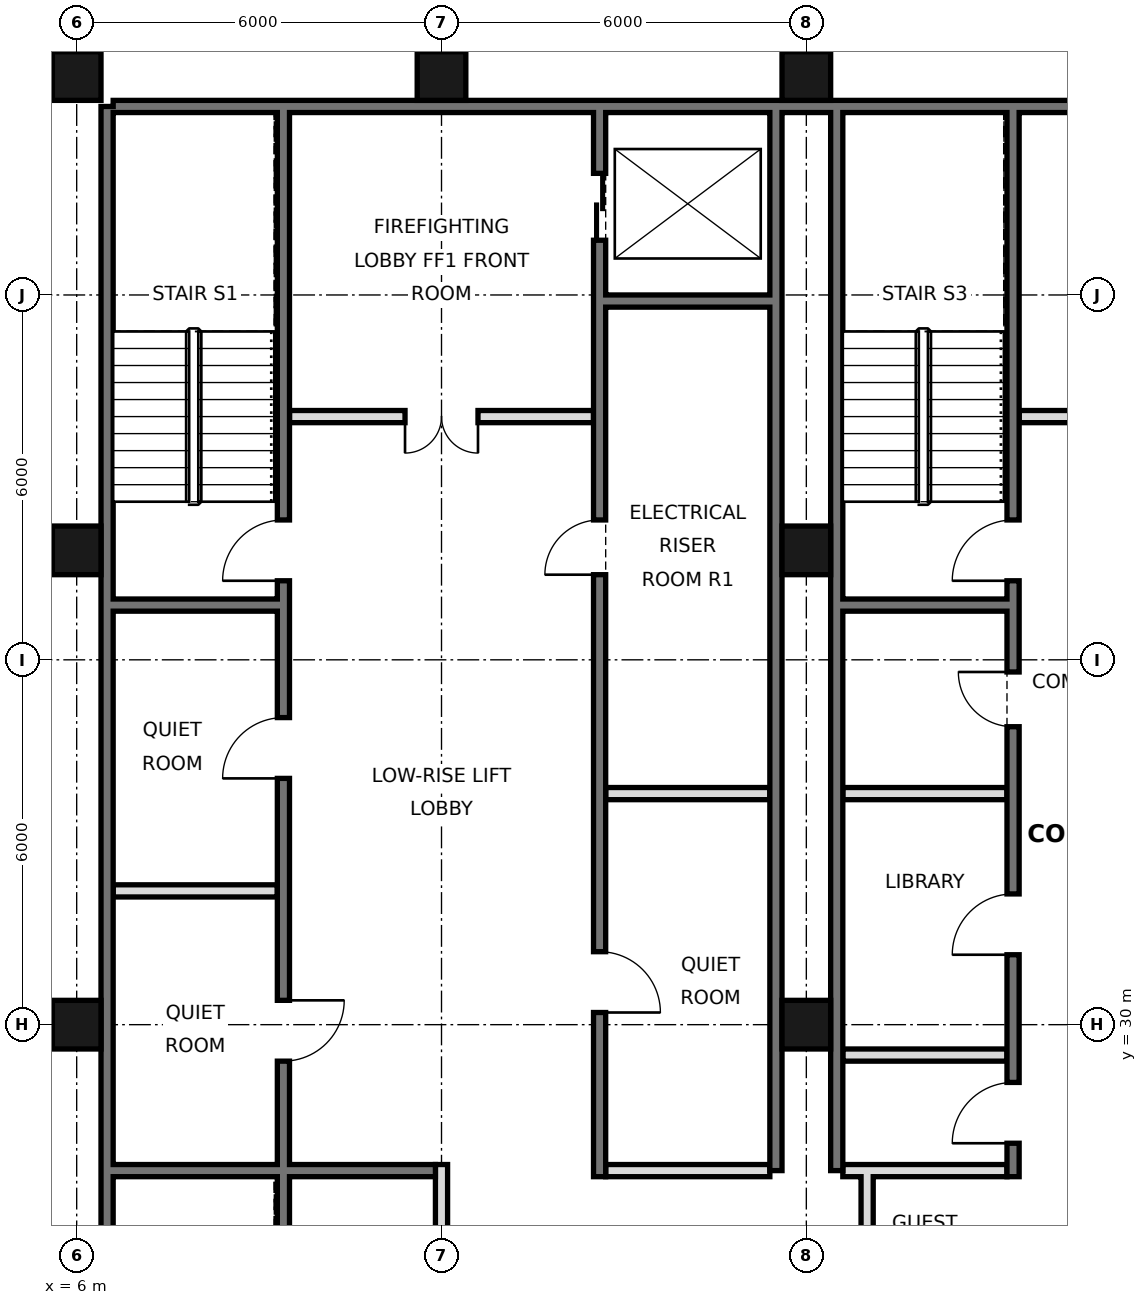
"""IFC4 building model, lengths in metres.
Left out: names, types, materials, properties, quantities, classifications, styles, units other than length and angle.
Written with IfcOpenShell. Run it as: python <this file> out.ifc"""

import sys

from ifc_helpers import new_model, si_unit, direction, frame, frame_2d, origin, origin_2d, place, context, subcontext, project, spatial, rectangle, hollow_rectangle, extrude, element, fill, save


model = new_model("IFC4")
c1 = context("Model", 3, precision=1e-05, world=origin(), true_north=direction((0.0, 1.0)))
c2 = subcontext(c1, "Body", "Model", "MODEL_VIEW")
j1 = project(units=[si_unit("LENGTHUNIT", "METRE"), si_unit("PLANEANGLEUNIT", "RADIAN")], contexts=[c1])
p1 = place(None, origin())
s1 = spatial("IfcSite", under=j1, at=p1, CompositionType="ELEMENT")
p2 = place(p1, origin())
s2 = spatial("IfcBuilding", under=s1, at=p2, CompositionType="ELEMENT")
p3 = place(p2, frame((0.0, 0.0, 266.6)))
s3 = spatial("IfcBuildingStorey", under=s2, at=p3, CompositionType="ELEMENT", Elevation=266.6)
for number, where, z_axis, x_axis in (
    (1, (6.0, 30.0, 0.0), (0.0, 0.0, 1.0), (1.0, 0.0, 0.0)),
    (2, (6.0, 37.8, 0.0), (0.0, 0.0, 1.0), (1.0, 0.0, 0.0)),
    (3, (6.0, 45.6, 0.0), (0.0, 0.0, 1.0), (1.0, 0.0, 0.0)),
    (4, (12.0, 45.6, 0.0), (0.0, 0.0, 1.0), (1.0, 0.0, 0.0)),
    (5, (18.0, 30.0, 0.0), (0.0, 0.0, 1.0), (1.0, 0.0, 0.0)),
    (6, (18.0, 37.8, 0.0), (0.0, 0.0, 1.0), (1.0, 0.0, 0.0)),
    (7, (18.0, 45.6, 0.0), (0.0, 0.0, 1.0), (1.0, 0.0, 0.0)),
):
    element("IfcColumn", number, at=place(p3, frame(where, z_axis=z_axis, x_axis=x_axis)), inside=s3, PredefinedType="COLUMN", context=c2, shape_type="SweptSolid", body=[
        extrude(hollow_rectangle(XDim=0.8, YDim=0.8, WallThickness=0.032, at=origin_2d()), origin(), (0.0, 0.0, 1.0), 3.6),
    ])
p4 = place(p3, frame((6.5, 21.6, 0.0), z_axis=(0.0, 0.0, 1.0), x_axis=(0.0, 1.0, 0.0)))
e8 = element("IfcWall", 8, at=p4, inside=s3, PredefinedType="SOLIDWALL", context=c2, shape_type="SweptSolid", body=[
    extrude(rectangle(XDim=23.5, YDim=0.2, at=frame_2d((11.75, 0.0))), origin(), (0.0, 0.0, 1.0), 3.42),
])
p5 = place(p3, frame((6.6, 45.1, 0.0), z_axis=(0.0, 0.0, 1.0), x_axis=(1.0, 0.0, 0.0)))
e9 = element("IfcWall", 9, at=p5, inside=s3, PredefinedType="SOLIDWALL", context=c2, shape_type="SweptSolid", body=[
    extrude(rectangle(XDim=34.8, YDim=0.2, at=frame_2d((17.4, 0.0))), origin(), (0.0, 0.0, 1.0), 3.42),
])
for number, where, z_axis, x_axis in (
    (10, (17.5, 27.6, 0.0), (0.0, 0.0, 1.0), (0.0, 1.0, 0.0)),
    (11, (18.5, 27.6, 0.0), (0.0, 0.0, 1.0), (0.0, 1.0, 0.0)),
):
    element("IfcWall", number, at=place(p3, frame(where, z_axis=z_axis, x_axis=x_axis)), inside=s3, PredefinedType="SOLIDWALL", context=c2, shape_type="SweptSolid", body=[
        extrude(rectangle(XDim=17.5, YDim=0.2, at=frame_2d((8.75, 0.0))), origin(), (0.0, 0.0, 1.0), 3.42),
    ])
p6 = place(p3, frame((19.0, 21.6, 0.0), z_axis=(0.0, 0.0, 1.0), x_axis=(0.0, 1.0, 0.0)))
e12 = element("IfcWall", 12, at=p6, inside=s3, PredefinedType="PARTITIONING", context=c2, shape_type="SweptSolid", body=[
    extrude(rectangle(XDim=6.0, YDim=0.2, at=frame_2d((3.0, 0.0))), origin(), (0.0, 0.0, 1.0), 3.42),
])
p7 = place(p6, frame((2.1, 0.0, 0.0)))
e13 = element("IfcOpeningElement", 13, at=p7, cuts=e12, PredefinedType="OPENING", context=c2, shape_type="SweptSolid", body=[
    extrude(rectangle(XDim=1.8, YDim=2.1, at=frame_2d((0.9, 1.05))), frame((0.0, 0.11, 0.0), z_axis=(0.0, -1.0, 0.0), x_axis=(1.0, 0.0, 0.0)), (0.0, 0.0, 1.0), 0.22),
])
p8 = place(p3, frame((12.0, 21.6, 0.0), z_axis=(0.0, 0.0, 1.0), x_axis=(0.0, 1.0, 0.0)))
e14 = element("IfcWall", 14, at=p8, inside=s3, PredefinedType="PARTITIONING", context=c2, shape_type="SweptSolid", body=[
    extrude(rectangle(XDim=6.1, YDim=0.2, at=frame_2d((3.05, 0.0))), origin(), (0.0, 0.0, 1.0), 3.42),
])
p9 = place(p3, frame((14.6, 27.5, 0.0), z_axis=(0.0, 0.0, 1.0), x_axis=(0.0, 1.0, 0.0)))
e15 = element("IfcWall", 15, at=p9, inside=s3, PredefinedType="SOLIDWALL", context=c2, shape_type="SweptSolid", body=[
    extrude(rectangle(XDim=17.5, YDim=0.2, at=frame_2d((8.75, 0.0))), origin(), (0.0, 0.0, 1.0), 3.42),
])
p10 = place(p9, frame((15.4, 0.0, 0.0)))
e16 = element("IfcOpeningElement", 16, at=p10, cuts=e15, PredefinedType="OPENING", context=c2, shape_type="SweptSolid", body=[
    extrude(rectangle(XDim=1.1, YDim=2.1, at=frame_2d((0.55, 1.05))), frame((0.0, 0.11, 0.0), z_axis=(0.0, -1.0, 0.0), x_axis=(1.0, 0.0, 0.0)), (0.0, 0.0, 1.0), 0.22),
])
p11 = place(p9, frame((2.7, 0.0, 0.0)))
e17 = element("IfcOpeningElement", 17, at=p11, cuts=e15, PredefinedType="OPENING", context=c2, shape_type="SweptSolid", body=[
    extrude(rectangle(XDim=1.0, YDim=2.1, at=frame_2d((0.5, 1.05))), frame((0.0, 0.11, 0.0), z_axis=(0.0, -1.0, 0.0), x_axis=(1.0, 0.0, 0.0)), (0.0, 0.0, 1.0), 0.22),
])
p12 = place(p9, frame((9.9, 0.0, 0.0)))
e18 = element("IfcOpeningElement", 18, at=p12, cuts=e15, PredefinedType="OPENING", context=c2, shape_type="SweptSolid", body=[
    extrude(rectangle(XDim=0.9, YDim=2.1, at=frame_2d((0.45, 1.05))), frame((0.0, 0.11, 0.0), z_axis=(0.0, -1.0, 0.0), x_axis=(1.0, 0.0, 0.0)), (0.0, 0.0, 1.0), 0.22),
])
p13 = place(p3, frame((21.4, 27.5, 0.0), z_axis=(0.0, 0.0, 1.0), x_axis=(0.0, 1.0, 0.0)))
e19 = element("IfcWall", 19, at=p13, inside=s3, PredefinedType="SOLIDWALL", context=c2, shape_type="SweptSolid", body=[
    extrude(rectangle(XDim=17.5, YDim=0.2, at=frame_2d((8.75, 0.0))), origin(), (0.0, 0.0, 1.0), 3.42),
])
p14 = place(p13, frame((0.55, 0.0, 0.0)))
e20 = element("IfcOpeningElement", 20, at=p14, cuts=e19, PredefinedType="OPENING", context=c2, shape_type="SweptSolid", body=[
    extrude(rectangle(XDim=1.0, YDim=2.1, at=frame_2d((0.5, 1.05))), frame((0.0, 0.11, 0.0), z_axis=(0.0, -1.0, 0.0), x_axis=(1.0, 0.0, 0.0)), (0.0, 0.0, 1.0), 0.22),
])
p15 = place(p13, frame((3.65, 0.0, 0.0)))
e21 = element("IfcOpeningElement", 21, at=p15, cuts=e19, PredefinedType="OPENING", context=c2, shape_type="SweptSolid", body=[
    extrude(rectangle(XDim=1.0, YDim=2.1, at=frame_2d((0.5, 1.05))), frame((0.0, 0.11, 0.0), z_axis=(0.0, -1.0, 0.0), x_axis=(1.0, 0.0, 0.0)), (0.0, 0.0, 1.0), 0.22),
])
p16 = place(p13, frame((9.8, 0.0, 0.0)))
e22 = element("IfcOpeningElement", 22, at=p16, cuts=e19, PredefinedType="OPENING", context=c2, shape_type="SweptSolid", body=[
    extrude(rectangle(XDim=1.0, YDim=2.1, at=frame_2d((0.5, 1.05))), frame((0.0, 0.11, 0.0), z_axis=(0.0, -1.0, 0.0), x_axis=(1.0, 0.0, 0.0)), (0.0, 0.0, 1.0), 0.22),
])
p17 = place(p13, frame((7.4, 0.0, 0.0)))
e23 = element("IfcOpeningElement", 23, at=p17, cuts=e19, PredefinedType="OPENING", context=c2, shape_type="SweptSolid", body=[
    extrude(rectangle(XDim=0.9, YDim=2.1, at=frame_2d((0.45, 1.05))), frame((0.0, 0.11, 0.0), z_axis=(0.0, -1.0, 0.0), x_axis=(1.0, 0.0, 0.0)), (0.0, 0.0, 1.0), 0.22),
])
p18 = place(p3, frame((9.4, 21.6, 0.0), z_axis=(0.0, 0.0, 1.0), x_axis=(0.0, 1.0, 0.0)))
e24 = element("IfcWall", 24, at=p18, inside=s3, PredefinedType="SOLIDWALL", context=c2, shape_type="SweptSolid", body=[
    extrude(rectangle(XDim=23.4, YDim=0.2, at=frame_2d((11.7, 0.0))), origin(), (0.0, 0.0, 1.0), 3.42),
])
p19 = place(p18, frame((7.8, 0.0, 0.0)))
e25 = element("IfcOpeningElement", 25, at=p19, cuts=e24, PredefinedType="OPENING", context=c2, shape_type="SweptSolid", body=[
    extrude(rectangle(XDim=1.0, YDim=2.1, at=frame_2d((0.5, 1.05))), frame((0.0, 0.11, 0.0), z_axis=(0.0, -1.0, 0.0), x_axis=(1.0, 0.0, 0.0)), (0.0, 0.0, 1.0), 0.22),
])
p20 = place(p18, frame((12.45, 0.0, 0.0)))
e26 = element("IfcOpeningElement", 26, at=p20, cuts=e24, PredefinedType="OPENING", context=c2, shape_type="SweptSolid", body=[
    extrude(rectangle(XDim=1.0, YDim=2.1, at=frame_2d((0.5, 1.05))), frame((0.0, 0.11, 0.0), z_axis=(0.0, -1.0, 0.0), x_axis=(1.0, 0.0, 0.0)), (0.0, 0.0, 1.0), 0.22),
])
p21 = place(p18, frame((15.7, 0.0, 0.0)))
e27 = element("IfcOpeningElement", 27, at=p21, cuts=e24, PredefinedType="OPENING", context=c2, shape_type="SweptSolid", body=[
    extrude(rectangle(XDim=1.0, YDim=2.1, at=frame_2d((0.5, 1.05))), frame((0.0, 0.11, 0.0), z_axis=(0.0, -1.0, 0.0), x_axis=(1.0, 0.0, 0.0)), (0.0, 0.0, 1.0), 0.22),
])
p22 = place(p18, frame((0.175, 0.0, 0.0)))
e28 = element("IfcOpeningElement", 28, at=p22, cuts=e24, PredefinedType="OPENING", context=c2, shape_type="SweptSolid", body=[
    extrude(rectangle(XDim=0.9, YDim=2.1, at=frame_2d((0.45, 1.05))), frame((0.0, 0.11, 0.0), z_axis=(0.0, -1.0, 0.0), x_axis=(1.0, 0.0, 0.0)), (0.0, 0.0, 1.0), 0.22),
])
for number, where, z_axis, x_axis in (
    (29, (14.7, 27.6, 0.0), (0.0, 0.0, 1.0), (1.0, 0.0, 0.0)),
    (30, (18.6, 27.6, 0.0), (0.0, 0.0, 1.0), (1.0, 0.0, 0.0)),
):
    element("IfcWall", number, at=place(p3, frame(where, z_axis=z_axis, x_axis=x_axis)), inside=s3, PredefinedType="PARTITIONING", context=c2, shape_type="SweptSolid", body=[
        extrude(rectangle(XDim=2.7, YDim=0.2, at=frame_2d((1.35, 0.0))), origin(), (0.0, 0.0, 1.0), 3.42),
    ])
p23 = place(p3, frame((6.6, 27.6, 0.0), z_axis=(0.0, 0.0, 1.0), x_axis=(1.0, 0.0, 0.0)))
e31 = element("IfcWall", 31, at=p23, inside=s3, PredefinedType="SOLIDWALL", context=c2, shape_type="SweptSolid", body=[
    extrude(rectangle(XDim=5.3, YDim=0.2, at=frame_2d((2.65, 0.0))), origin(), (0.0, 0.0, 1.0), 3.42),
])
for number, where, z_axis, x_axis in (
    (32, (18.6, 29.5, 0.0), (0.0, 0.0, 1.0), (1.0, 0.0, 0.0)),
    (33, (6.6, 32.2, 0.0), (0.0, 0.0, 1.0), (1.0, 0.0, 0.0)),
):
    element("IfcWall", number, at=place(p3, frame(where, z_axis=z_axis, x_axis=x_axis)), inside=s3, PredefinedType="PARTITIONING", context=c2, shape_type="SweptSolid", body=[
        extrude(rectangle(XDim=2.7, YDim=0.2, at=frame_2d((1.35, 0.0))), origin(), (0.0, 0.0, 1.0), 3.42),
    ])
for number, where, z_axis, x_axis in (
    (34, (14.7, 33.8, 0.0), (0.0, 0.0, 1.0), (1.0, 0.0, 0.0)),
    (35, (18.6, 33.8, 0.0), (0.0, 0.0, 1.0), (1.0, 0.0, 0.0)),
    (36, (18.6, 36.9, 0.0), (0.0, 0.0, 1.0), (1.0, 0.0, 0.0)),
    (37, (6.6, 36.9, 0.0), (0.0, 0.0, 1.0), (1.0, 0.0, 0.0)),
):
    element("IfcWall", number, at=place(p3, frame(where, z_axis=z_axis, x_axis=x_axis)), inside=s3, PredefinedType="SOLIDWALL", context=c2, shape_type="SweptSolid", body=[
        extrude(rectangle(XDim=2.7, YDim=0.2, at=frame_2d((1.35, 0.0))), origin(), (0.0, 0.0, 1.0), 3.42),
    ])
p24 = place(p3, frame((21.5, 40.0, 0.0), z_axis=(0.0, 0.0, 1.0), x_axis=(1.0, 0.0, 0.0)))
e38 = element("IfcWall", 38, at=p24, inside=s3, PredefinedType="PARTITIONING", context=c2, shape_type="SweptSolid", body=[
    extrude(rectangle(XDim=5.0, YDim=0.2, at=frame_2d((2.5, 0.0))), origin(), (0.0, 0.0, 1.0), 3.42),
])
p25 = place(p24, frame((1.9, 0.0, 0.0)))
e39 = element("IfcOpeningElement", 39, at=p25, cuts=e38, PredefinedType="OPENING", context=c2, shape_type="SweptSolid", body=[
    extrude(rectangle(XDim=1.2, YDim=2.1, at=frame_2d((0.6, 1.05))), frame((0.0, 0.11, 0.0), z_axis=(0.0, -1.0, 0.0), x_axis=(1.0, 0.0, 0.0)), (0.0, 0.0, 1.0), 0.22),
])
p26 = place(p3, frame((9.5, 40.0, 0.0), z_axis=(0.0, 0.0, 1.0), x_axis=(1.0, 0.0, 0.0)))
e40 = element("IfcWall", 40, at=p26, inside=s3, PredefinedType="PARTITIONING", context=c2, shape_type="SweptSolid", body=[
    extrude(rectangle(XDim=5.0, YDim=0.2, at=frame_2d((2.5, 0.0))), origin(), (0.0, 0.0, 1.0), 3.42),
])
p27 = place(p26, frame((1.9, 0.0, 0.0)))
e41 = element("IfcOpeningElement", 41, at=p27, cuts=e40, PredefinedType="OPENING", context=c2, shape_type="SweptSolid", body=[
    extrude(rectangle(XDim=1.2, YDim=2.1, at=frame_2d((0.6, 1.05))), frame((0.0, 0.11, 0.0), z_axis=(0.0, -1.0, 0.0), x_axis=(1.0, 0.0, 0.0)), (0.0, 0.0, 1.0), 0.22),
])
p28 = place(p3, frame((14.7, 41.9, 0.0), z_axis=(0.0, 0.0, 1.0), x_axis=(1.0, 0.0, 0.0)))
e42 = element("IfcWall", 42, at=p28, inside=s3, PredefinedType="SOLIDWALL", context=c2, shape_type="SweptSolid", body=[
    extrude(rectangle(XDim=2.7, YDim=0.2, at=frame_2d((1.35, 0.0))), origin(), (0.0, 0.0, 1.0), 3.42),
])
p29 = place(p27, frame((1.2, 0.0, 0.0), z_axis=(0.0, 0.0, 1.0), x_axis=(-1.0, 0.0, 0.0)))
e43 = element("IfcDoor", 43, at=p29, inside=s3, OperationType="DOUBLE_DOOR_SINGLE_SWING", PredefinedType="DOOR", context=c2, shape_type="SweptSolid", body=[
    extrude(rectangle(XDim=1.2, YDim=2.1, at=frame_2d((0.6, 1.05))), frame((0.0, 0.025, 0.0), z_axis=(0.0, -1.0, 0.0), x_axis=(1.0, 0.0, 0.0)), (0.0, 0.0, 1.0), 0.05),
])
fill(e41, e43)
p30 = place(p10, origin())
e44 = element("IfcDoor", 44, at=p30, inside=s3, OperationType="DOUBLE_DOOR_SLIDING", PredefinedType="DOOR", context=c2, shape_type="SweptSolid", body=[
    extrude(rectangle(XDim=1.1, YDim=2.1, at=frame_2d((0.55, 1.05))), frame((0.0, 0.025, 0.0), z_axis=(0.0, -1.0, 0.0), x_axis=(1.0, 0.0, 0.0)), (0.0, 0.0, 1.0), 0.05),
])
fill(e16, e44)
p31 = place(p14, origin())
e45 = element("IfcDoor", 45, at=p31, inside=s3, OperationType="SINGLE_SWING_LEFT", PredefinedType="DOOR", context=c2, shape_type="SweptSolid", body=[
    extrude(rectangle(XDim=1.0, YDim=2.1, at=frame_2d((0.5, 1.05))), frame((0.0, 0.025, 0.0), z_axis=(0.0, -1.0, 0.0), x_axis=(1.0, 0.0, 0.0)), (0.0, 0.0, 1.0), 0.05),
])
fill(e20, e45)
p32 = place(p15, origin())
e46 = element("IfcDoor", 46, at=p32, inside=s3, OperationType="SINGLE_SWING_LEFT", PredefinedType="DOOR", context=c2, shape_type="SweptSolid", body=[
    extrude(rectangle(XDim=1.0, YDim=2.1, at=frame_2d((0.5, 1.05))), frame((0.0, 0.025, 0.0), z_axis=(0.0, -1.0, 0.0), x_axis=(1.0, 0.0, 0.0)), (0.0, 0.0, 1.0), 0.05),
])
fill(e21, e46)
p33 = place(p11, frame((1.0, 0.0, 0.0), z_axis=(0.0, 0.0, 1.0), x_axis=(-1.0, 0.0, 0.0)))
e47 = element("IfcDoor", 47, at=p33, inside=s3, OperationType="SINGLE_SWING_RIGHT", PredefinedType="DOOR", context=c2, shape_type="SweptSolid", body=[
    extrude(rectangle(XDim=1.0, YDim=2.1, at=frame_2d((0.5, 1.05))), frame((0.0, 0.025, 0.0), z_axis=(0.0, -1.0, 0.0), x_axis=(1.0, 0.0, 0.0)), (0.0, 0.0, 1.0), 0.05),
])
fill(e17, e47)
p34 = place(p19, origin())
e48 = element("IfcDoor", 48, at=p34, inside=s3, OperationType="SINGLE_SWING_RIGHT", PredefinedType="DOOR", context=c2, shape_type="SweptSolid", body=[
    extrude(rectangle(XDim=1.0, YDim=2.1, at=frame_2d((0.5, 1.05))), frame((0.0, 0.025, 0.0), z_axis=(0.0, -1.0, 0.0), x_axis=(1.0, 0.0, 0.0)), (0.0, 0.0, 1.0), 0.05),
])
fill(e25, e48)
p35 = place(p20, origin())
e49 = element("IfcDoor", 49, at=p35, inside=s3, OperationType="SINGLE_SWING_LEFT", PredefinedType="DOOR", context=c2, shape_type="SweptSolid", body=[
    extrude(rectangle(XDim=1.0, YDim=2.1, at=frame_2d((0.5, 1.05))), frame((0.0, 0.025, 0.0), z_axis=(0.0, -1.0, 0.0), x_axis=(1.0, 0.0, 0.0)), (0.0, 0.0, 1.0), 0.05),
])
fill(e26, e49)
p36 = place(p21, origin())
e50 = element("IfcDoor", 50, at=p36, inside=s3, OperationType="SINGLE_SWING_LEFT", PredefinedType="DOOR", context=c2, shape_type="SweptSolid", body=[
    extrude(rectangle(XDim=1.0, YDim=2.1, at=frame_2d((0.5, 1.05))), frame((0.0, 0.025, 0.0), z_axis=(0.0, -1.0, 0.0), x_axis=(1.0, 0.0, 0.0)), (0.0, 0.0, 1.0), 0.05),
])
fill(e27, e50)
p37 = place(p16, origin())
e51 = element("IfcDoor", 51, at=p37, inside=s3, OperationType="SINGLE_SWING_LEFT", PredefinedType="DOOR", context=c2, shape_type="SweptSolid", body=[
    extrude(rectangle(XDim=1.0, YDim=2.1, at=frame_2d((0.5, 1.05))), frame((0.0, 0.025, 0.0), z_axis=(0.0, -1.0, 0.0), x_axis=(1.0, 0.0, 0.0)), (0.0, 0.0, 1.0), 0.05),
])
fill(e22, e51)
p38 = place(p12, origin())
e52 = element("IfcDoor", 52, at=p38, inside=s3, OperationType="SINGLE_SWING_LEFT", PredefinedType="DOOR", context=c2, shape_type="SweptSolid", body=[
    extrude(rectangle(XDim=0.9, YDim=2.1, at=frame_2d((0.45, 1.05))), frame((0.0, 0.025, 0.0), z_axis=(0.0, -1.0, 0.0), x_axis=(1.0, 0.0, 0.0)), (0.0, 0.0, 1.0), 0.05),
])
fill(e18, e52)
p39 = place(p17, frame((0.9, 0.0, 0.0), z_axis=(0.0, 0.0, 1.0), x_axis=(-1.0, 0.0, 0.0)))
e53 = element("IfcDoor", 53, at=p39, inside=s3, OperationType="SINGLE_SWING_LEFT", PredefinedType="DOOR", context=c2, shape_type="SweptSolid", body=[
    extrude(rectangle(XDim=0.9, YDim=2.1, at=frame_2d((0.45, 1.05))), frame((0.0, 0.025, 0.0), z_axis=(0.0, -1.0, 0.0), x_axis=(1.0, 0.0, 0.0)), (0.0, 0.0, 1.0), 0.05),
])
fill(e23, e53)
save(model, sys.argv[1])
